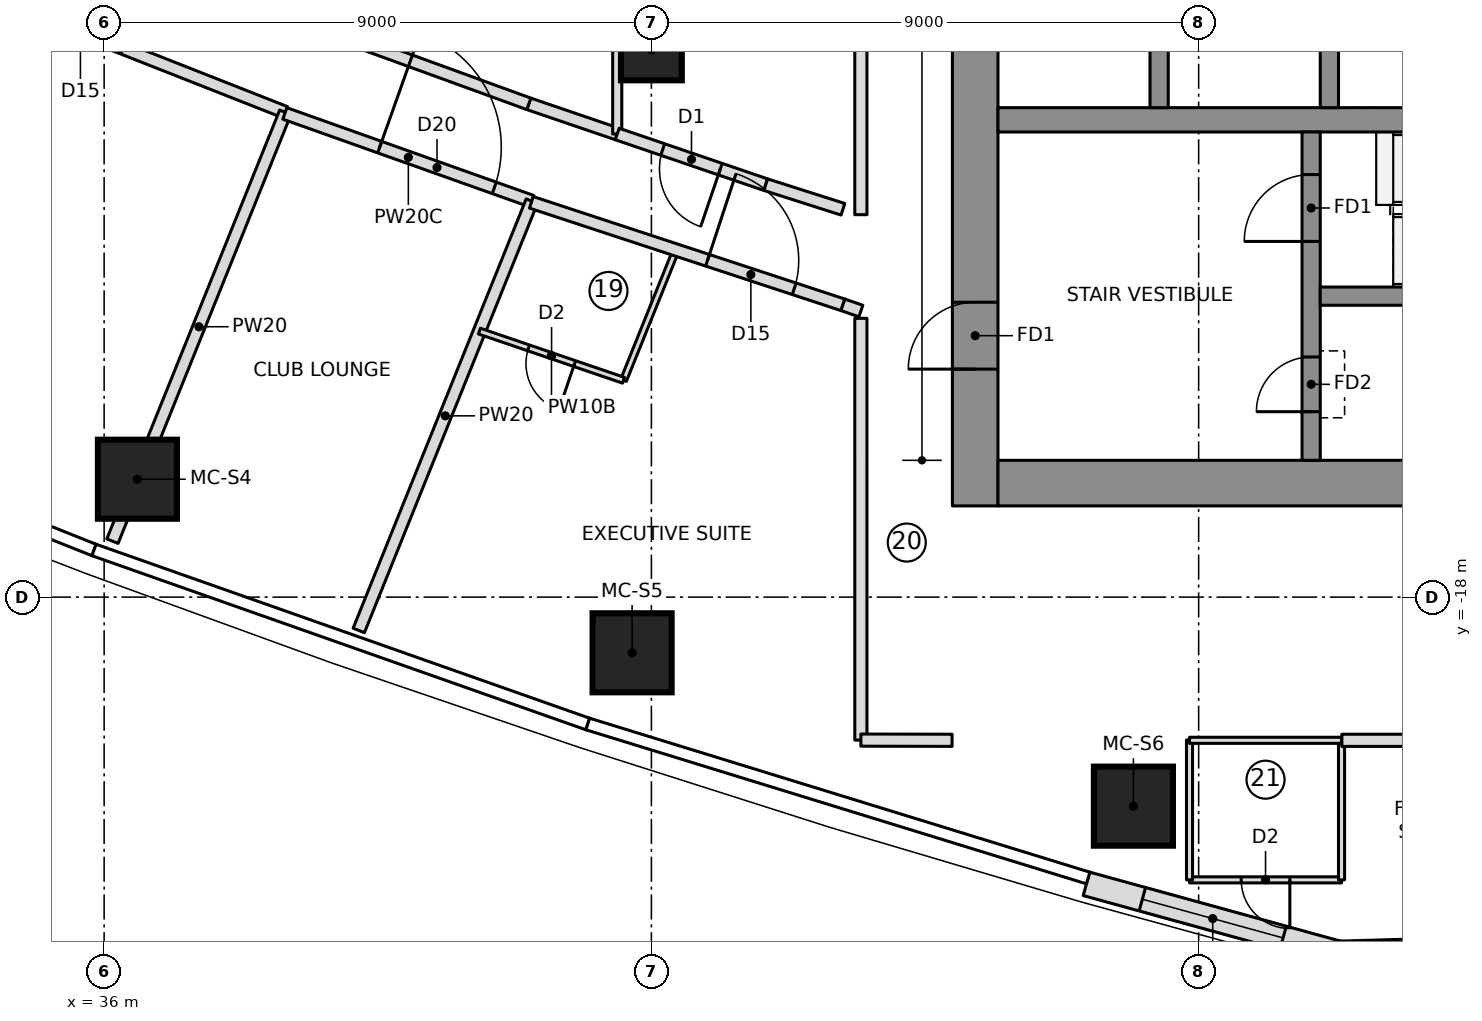
"""IFC4 building model, lengths in metres.
Left out: names, types, materials, properties, quantities, classifications, styles, units other than length and angle.
Written with IfcOpenShell. Run it as: python <this file> out.ifc"""

import sys

from ifc_helpers import new_model, si_unit, direction, frame, frame_2d, origin, origin_2d, place, context, subcontext, project, spatial, polyline, rectangle, outline, extrude, element, fill, save


model = new_model("IFC4")
c1 = context("Model", 3, precision=1e-05, world=origin(), true_north=direction((0.0, 1.0)))
c2 = subcontext(c1, "Body", "Model", "MODEL_VIEW")
j1 = project(units=[si_unit("LENGTHUNIT", "METRE"), si_unit("PLANEANGLEUNIT", "RADIAN")], contexts=[c1])
p1 = place(None, origin())
s1 = spatial("IfcSite", under=j1, at=p1, CompositionType="ELEMENT")
p2 = place(p1, origin())
s2 = spatial("IfcBuilding", under=s1, at=p2, CompositionType="ELEMENT")
p3 = place(p2, frame((0.0, 0.0, 200.35)))
s3 = spatial("IfcBuildingStorey", under=s2, at=p3, CompositionType="ELEMENT", Elevation=200.35)
p4 = place(p3, frame((50.325, -16.5, 0.0), z_axis=(0.0, 0.0, 1.0), x_axis=(0.0, 1.0, 0.0)))
e1 = element("IfcWall", 1, at=p4, inside=s3, PredefinedType="SHEAR", context=c2, shape_type="SweptSolid", body=[
    extrude(rectangle(XDim=9.85, YDim=0.75, at=frame_2d((4.925, 0.0))), origin(), (0.0, 0.0, 1.0), 3.55),
])
p5 = place(p4, frame((2.25, 0.0, 0.0)))
e2 = element("IfcOpeningElement", 2, at=p5, cuts=e1, PredefinedType="OPENING", context=c2, shape_type="SweptSolid", body=[
    extrude(rectangle(XDim=1.1, YDim=2.1, at=frame_2d((0.55, 1.05))), frame((0.0, 0.385, 0.0), z_axis=(0.0, -1.0, 0.0), x_axis=(1.0, 0.0, 0.0)), (0.0, 0.0, 1.0), 0.77),
])
p6 = place(p3, frame((50.7, -16.125, 0.0), z_axis=(0.0, 0.0, 1.0), x_axis=(1.0, 0.0, 0.0)))
e3 = element("IfcWall", 3, at=p6, inside=s3, PredefinedType="SHEAR", context=c2, shape_type="SweptSolid", body=[
    extrude(rectangle(XDim=13.77, YDim=0.75, at=frame_2d((6.885, 0.0))), origin(), (0.0, 0.0, 1.0), 3.55),
])
p7 = place(p3, frame((50.7, -10.15, 0.0), z_axis=(0.0, 0.0, 1.0), x_axis=(1.0, 0.0, 0.0)))
e4 = element("IfcWall", 4, at=p7, inside=s3, PredefinedType="SHEAR", context=c2, shape_type="SweptSolid", body=[
    extrude(rectangle(XDim=13.02, YDim=0.4, at=frame_2d((6.51, 0.0))), origin(), (0.0, 0.0, 1.0), 3.55),
])
for number, where, z_axis, x_axis in (
    (5, (53.35, -9.95, 0.0), (0.0, 0.0, 1.0), (0.0, 1.0, 0.0)),
    (6, (56.15, -9.95, 0.0), (0.0, 0.0, 1.0), (0.0, 1.0, 0.0)),
):
    element("IfcWall", number, at=place(p3, frame(where, z_axis=z_axis, x_axis=x_axis)), inside=s3, PredefinedType="SHEAR", context=c2, shape_type="SweptSolid", body=[
        extrude(rectangle(XDim=3.0, YDim=0.3, at=frame_2d((1.5, 0.0))), origin(), (0.0, 0.0, 1.0), 3.55),
    ])
p8 = place(p3, frame((55.85, -15.75, 0.0), z_axis=(0.0, 0.0, 1.0), x_axis=(0.0, 1.0, 0.0)))
e7 = element("IfcWall", 7, at=p8, inside=s3, PredefinedType="SHEAR", context=c2, shape_type="SweptSolid", body=[
    extrude(rectangle(XDim=5.4, YDim=0.3, at=frame_2d((2.7, 0.0))), origin(), (0.0, 0.0, 1.0), 3.55),
])
p9 = place(p8, frame((3.6, 0.0, 0.0)))
e8 = element("IfcOpeningElement", 8, at=p9, cuts=e7, PredefinedType="OPENING", context=c2, shape_type="SweptSolid", body=[
    extrude(rectangle(XDim=1.1, YDim=2.1, at=frame_2d((0.55, 1.05))), frame((0.0, 0.16, 0.0), z_axis=(0.0, -1.0, 0.0), x_axis=(1.0, 0.0, 0.0)), (0.0, 0.0, 1.0), 0.32),
])
p10 = place(p8, frame((0.8, 0.0, 0.0)))
e9 = element("IfcOpeningElement", 9, at=p10, cuts=e7, PredefinedType="OPENING", context=c2, shape_type="SweptSolid", body=[
    extrude(rectangle(XDim=0.9, YDim=2.1, at=frame_2d((0.45, 1.05))), frame((0.0, 0.16, 0.0), z_axis=(0.0, -1.0, 0.0), x_axis=(1.0, 0.0, 0.0)), (0.0, 0.0, 1.0), 0.32),
])
p11 = place(p3, frame((56.0, -13.05, 0.0), z_axis=(0.0, 0.0, 1.0), x_axis=(1.0, 0.0, 0.0)))
e10 = element("IfcWall", 10, at=p11, inside=s3, PredefinedType="SHEAR", context=c2, shape_type="SweptSolid", body=[
    extrude(rectangle(XDim=7.72, YDim=0.3, at=frame_2d((3.86, 0.0))), origin(), (0.0, 0.0, 1.0), 3.55),
])
for number, where, z_axis, x_axis in (
    (11, (36.547, -16.061, 0.0), (0.0, 0.0, 1.0), (1.0, 0.0, 0.0)),
    (12, (44.683, -18.916, 0.0), (0.0, 0.0, 1.0), (1.0, 0.0, 0.0)),
    (13, (52.927, -21.438, 0.0), (0.0, 0.0, 1.0), (1.0, 0.0, 0.0)),
):
    element("IfcColumn", number, at=place(p3, frame(where, z_axis=z_axis, x_axis=x_axis)), inside=s3, PredefinedType="COLUMN", context=c2, shape_type="SweptSolid", body=[
        extrude(rectangle(XDim=1.3, YDim=1.3, at=origin_2d()), origin(), (0.0, 0.0, 1.0), 3.55),
    ])
p12 = place(p3, frame((45.0, -9.0, 0.0), z_axis=(0.0, 0.0, 1.0), x_axis=(1.0, 0.0, 0.0)))
e14 = element("IfcColumn", 14, at=p12, inside=s3, PredefinedType="COLUMN", context=c2, shape_type="SweptSolid", body=[
    extrude(rectangle(XDim=1.0, YDim=1.0, at=origin_2d()), origin(), (0.0, 0.0, 1.0), 3.55),
])
p13 = place(p3, frame((52.155, -22.716, 0.0), z_axis=(0.0, 0.0, 1.0), x_axis=(0.964205755089, -0.265155165617, 0.0)))
e15 = element("IfcWall", 15, at=p13, inside=s3, PredefinedType="NOTDEFINED", context=c2, shape_type="SweptSolid", body=[
    extrude(outline(polyline([(0.0, -0.2), (4.337, -0.2), (4.277, 0.2), (0.0, 0.2), (0.0, -0.2)])), origin(), (0.0, 0.0, 1.0), 3.25),
])
p14 = place(p13, frame((0.954, 0.0, 0.5)))
e16 = element("IfcOpeningElement", 16, at=p14, cuts=e15, PredefinedType="OPENING", context=c2, shape_type="SweptSolid", body=[
    extrude(rectangle(XDim=2.4, YDim=2.0, at=frame_2d((1.2, 1.0))), frame((0.0, 0.21, 0.0), z_axis=(0.0, -1.0, 0.0), x_axis=(1.0, 0.0, 0.0)), (0.0, 0.0, 1.0), 0.42),
])
p15 = place(p3, frame((56.308, -23.858, 0.0), z_axis=(0.0, 0.0, 1.0), x_axis=(0.999587920197, 0.028705222472, 0.0)))
e17 = element("IfcWall", 17, at=p15, inside=s3, PredefinedType="NOTDEFINED", context=c2, shape_type="SweptSolid", body=[
    extrude(outline(polyline([(-0.03, -0.2), (3.989, -0.2), (3.87, 0.2), (0.03, 0.2), (-0.03, -0.2)])), origin(), (0.0, 0.0, 1.0), 3.25),
])
p16 = place(p15, frame((0.865, 0.0, 0.6)))
e18 = element("IfcOpeningElement", 18, at=p16, cuts=e17, PredefinedType="OPENING", context=c2, shape_type="SweptSolid", body=[
    extrude(outline(polyline([(0.0, 1.35), (0.084, 1.771), (0.322, 2.128), (0.679, 2.366), (1.1, 2.45), (1.521, 2.366), (1.878, 2.128), (2.116, 1.771), (2.2, 1.35), (2.2, 1.1), (2.116, 0.679), (1.878, 0.322), (1.521, 0.084), (1.1, 0.0), (0.679, 0.084), (0.322, 0.322), (0.084, 0.679), (0.0, 1.1), (0.0, 1.35)])), frame((0.0, 0.21, 0.0), z_axis=(0.0, -1.0, 0.0), x_axis=(1.0, 0.0, 0.0)), (0.0, 0.0, 1.0), 0.42),
])
p17 = place(p3, frame((56.35, -22.65, 0.0), z_axis=(0.0, 0.0, 1.0), x_axis=(-1.0, 0.0, 0.0)))
e19 = element("IfcWall", 19, at=p17, inside=s3, PredefinedType="PARTITIONING", context=c2, shape_type="SweptSolid", body=[
    extrude(rectangle(XDim=2.5, YDim=0.1, at=frame_2d((1.25, 0.0))), origin(), (0.0, 0.0, 1.0), 3.25),
])
p18 = place(p17, frame((0.85, 0.0, 0.0)))
e20 = element("IfcOpeningElement", 20, at=p18, cuts=e19, PredefinedType="OPENING", context=c2, shape_type="SweptSolid", body=[
    extrude(rectangle(XDim=0.8, YDim=2.1, at=frame_2d((0.4, 1.05))), frame((0.0, 0.06, 0.0), z_axis=(0.0, -1.0, 0.0), x_axis=(1.0, 0.0, 0.0)), (0.0, 0.0, 1.0), 0.12),
])
for number, where, z_axis, x_axis in (
    (21, (53.85, -22.65, 0.0), (0.0, 0.0, 1.0), (0.0, 1.0, 0.0)),
    (22, (56.35, -20.35, 0.0), (0.0, 0.0, 1.0), (0.0, -1.0, 0.0)),
):
    element("IfcWall", number, at=place(p3, frame(where, z_axis=z_axis, x_axis=x_axis)), inside=s3, PredefinedType="PARTITIONING", context=c2, shape_type="SweptSolid", body=[
        extrude(rectangle(XDim=2.3, YDim=0.1, at=frame_2d((1.15, 0.0))), origin(), (0.0, 0.0, 1.0), 3.25),
    ])
p19 = place(p3, frame((30.958, -6.866, 0.0), z_axis=(0.0, 0.0, 1.0), x_axis=(0.93040517394, -0.366532689274, 0.0)))
e23 = element("IfcWall", 23, at=p19, inside=s3, PredefinedType="PARTITIONING", context=c2, shape_type="SweptSolid", body=[
    extrude(rectangle(XDim=8.622, YDim=0.2, at=frame_2d((4.311, 0.0))), origin(), (0.0, 0.0, 1.0), 3.25),
])
p20 = place(p19, frame((4.25, 0.0, 0.0)))
e24 = element("IfcOpeningElement", 24, at=p20, cuts=e23, PredefinedType="OPENING", context=c2, shape_type="SweptSolid", body=[
    extrude(rectangle(XDim=1.5, YDim=2.1, at=frame_2d((0.75, 1.05))), frame((0.0, 0.11, 0.0), z_axis=(0.0, -1.0, 0.0), x_axis=(1.0, 0.0, 0.0)), (0.0, 0.0, 1.0), 0.22),
])
p21 = place(p3, frame((36.137, -17.079, 0.0), z_axis=(0.0, 0.0, 1.0), x_axis=(0.373863662938, 0.927483671843, 0.0)))
e25 = element("IfcWall", 25, at=p21, inside=s3, PredefinedType="PARTITIONING", context=c2, shape_type="SweptSolid", body=[
    extrude(rectangle(XDim=7.604, YDim=0.2, at=frame_2d((3.802, 0.0))), origin(), (0.0, 0.0, 1.0), 3.25),
])
p22 = place(p3, frame((38.972, -10.045, 0.0), z_axis=(0.0, 0.0, 1.0), x_axis=(0.942220252757, -0.334994022773, 0.0)))
e26 = element("IfcWall", 26, at=p22, inside=s3, PredefinedType="PARTITIONING", context=c2, shape_type="SweptSolid", body=[
    extrude(rectangle(XDim=4.31, YDim=0.2, at=frame_2d((2.155, 0.0))), origin(), (0.0, 0.0, 1.0), 3.25),
])
p23 = place(p22, frame((1.655, 0.0, 0.0)))
e27 = element("IfcOpeningElement", 27, at=p23, cuts=e26, PredefinedType="OPENING", context=c2, shape_type="SweptSolid", body=[
    extrude(rectangle(XDim=2.0, YDim=2.4, at=frame_2d((1.0, 1.2))), frame((0.0, 0.11, 0.0), z_axis=(0.0, -1.0, 0.0), x_axis=(1.0, 0.0, 0.0)), (0.0, 0.0, 1.0), 0.22),
])
p24 = place(p3, frame((40.188, -18.548, 0.0), z_axis=(0.0, 0.0, 1.0), x_axis=(0.373877998371, 0.927477893178, 0.0)))
e28 = element("IfcWall", 28, at=p24, inside=s3, PredefinedType="PARTITIONING", context=c2, shape_type="SweptSolid", body=[
    extrude(rectangle(XDim=7.611, YDim=0.2, at=frame_2d((3.806, 0.0))), origin(), (0.0, 0.0, 1.0), 3.25),
])
p25 = place(p3, frame((45.395, -12.318, 0.0), z_axis=(0.0, 0.0, 1.0), x_axis=(-0.373917841166, -0.927461831052, 0.0)))
e29 = element("IfcWall", 29, at=p25, inside=s3, PredefinedType="PARTITIONING", context=c2, shape_type="SweptSolid", body=[
    extrude(rectangle(XDim=2.281, YDim=0.1, at=frame_2d((1.14, 0.0))), origin(), (0.0, 0.0, 1.0), 3.25),
])
p26 = place(p3, frame((44.542, -14.434, 0.0), z_axis=(0.0, 0.0, 1.0), x_axis=(-0.946406575113, 0.322977699822, 0.0)))
e30 = element("IfcWall", 30, at=p26, inside=s3, PredefinedType="PARTITIONING", context=c2, shape_type="SweptSolid", body=[
    extrude(rectangle(XDim=2.504, YDim=0.1, at=frame_2d((1.252, 0.0))), origin(), (0.0, 0.0, 1.0), 3.25),
])
p27 = place(p26, frame((0.85, 0.0, 0.0)))
e31 = element("IfcOpeningElement", 31, at=p27, cuts=e30, PredefinedType="OPENING", context=c2, shape_type="SweptSolid", body=[
    extrude(rectangle(XDim=0.8, YDim=2.1, at=frame_2d((0.4, 1.05))), frame((0.0, 0.06, 0.0), z_axis=(0.0, -1.0, 0.0), x_axis=(1.0, 0.0, 0.0)), (0.0, 0.0, 1.0), 0.12),
])
p28 = place(p3, frame((44.438, -10.383, 0.0), z_axis=(0.0, 0.0, 1.0), x_axis=(-0.946450589454, 0.32284869788, 0.0)))
e32 = element("IfcWall", 32, at=p28, inside=s3, PredefinedType="PARTITIONING", context=c2, shape_type="SweptSolid", body=[
    extrude(rectangle(XDim=1.536, YDim=0.2, at=frame_2d((0.768, 0.0))), origin(), (0.0, 0.0, 1.0), 3.25),
])
p29 = place(p3, frame((42.984, -9.887, 0.0), z_axis=(0.0, 0.0, 1.0), x_axis=(-0.939727613335, 0.341923986779, 0.0)))
e33 = element("IfcWall", 33, at=p29, inside=s3, PredefinedType="PARTITIONING", context=c2, shape_type="SweptSolid", body=[
    extrude(rectangle(XDim=4.117, YDim=0.2, at=frame_2d((2.059, 0.0))), origin(), (0.0, 0.0, 1.0), 3.25),
])
p30 = place(p3, frame((44.438, -10.383, 0.0), z_axis=(0.0, 0.0, 1.0), x_axis=(0.0, 1.0, 0.0)))
e34 = element("IfcWall", 34, at=p30, inside=s3, PredefinedType="PARTITIONING", context=c2, shape_type="SweptSolid", body=[
    extrude(rectangle(XDim=20.766, YDim=0.15, at=frame_2d((10.383, 0.0))), origin(), (0.0, 0.0, 1.0), 3.25),
])
p31 = place(p3, frame((46.881, -11.217, 0.0), z_axis=(0.0, 0.0, 1.0), x_axis=(-0.946427432629, 0.322916575554, 0.0)))
e35 = element("IfcWall", 35, at=p31, inside=s3, PredefinedType="PARTITIONING", context=c2, shape_type="SweptSolid", body=[
    extrude(rectangle(XDim=2.581, YDim=0.2, at=frame_2d((1.291, 0.0))), origin(), (0.0, 0.0, 1.0), 3.25),
])
p32 = place(p31, frame((0.791, 0.0, 0.0)))
e36 = element("IfcOpeningElement", 36, at=p32, cuts=e35, PredefinedType="OPENING", context=c2, shape_type="SweptSolid", body=[
    extrude(rectangle(XDim=1.0, YDim=2.1, at=frame_2d((0.5, 1.05))), frame((0.0, 0.11, 0.0), z_axis=(0.0, -1.0, 0.0), x_axis=(1.0, 0.0, 0.0)), (0.0, 0.0, 1.0), 0.22),
])
p33 = place(p3, frame((56.355, -20.355, 0.0), z_axis=(0.0, 0.0, 1.0), x_axis=(1.0, 0.0, 0.0)))
e37 = element("IfcWall", 37, at=p33, inside=s3, PredefinedType="PARTITIONING", context=c2, shape_type="SweptSolid", body=[
    extrude(rectangle(XDim=7.354, YDim=0.2, at=frame_2d((3.677, 0.0))), origin(), (0.0, 0.0, 1.0), 3.25),
])
p34 = place(p33, frame((2.624, 0.0, 0.0)))
e38 = element("IfcOpeningElement", 38, at=p34, cuts=e37, PredefinedType="OPENING", context=c2, shape_type="SweptSolid", body=[
    extrude(rectangle(XDim=1.5, YDim=2.1, at=frame_2d((0.75, 1.05))), frame((0.0, 0.11, 0.0), z_axis=(0.0, -1.0, 0.0), x_axis=(1.0, 0.0, 0.0)), (0.0, 0.0, 1.0), 0.22),
])
p35 = place(p3, frame((53.85, -20.355, 0.0), z_axis=(0.0, 0.0, 1.0), x_axis=(1.0, 0.0, 0.0)))
e39 = element("IfcWall", 39, at=p35, inside=s3, PredefinedType="PARTITIONING", context=c2, shape_type="SweptSolid", body=[
    extrude(rectangle(XDim=2.5, YDim=0.1, at=frame_2d((1.25, 0.0))), origin(), (0.0, 0.0, 1.0), 3.25),
])
p36 = place(p3, frame((43.026, -11.507, 0.0), z_axis=(0.0, 0.0, 1.0), x_axis=(0.949951949432, -0.312396052744, 0.0)))
e40 = element("IfcWall", 40, at=p36, inside=s3, PredefinedType="PARTITIONING", context=c2, shape_type="SweptSolid", body=[
    extrude(rectangle(XDim=5.394, YDim=0.2, at=frame_2d((2.697, 0.0))), origin(), (0.0, 0.0, 1.0), 3.25),
])
p37 = place(p36, frame((3.05, 0.0, 0.0)))
e41 = element("IfcOpeningElement", 41, at=p37, cuts=e40, PredefinedType="OPENING", context=c2, shape_type="SweptSolid", body=[
    extrude(rectangle(XDim=1.5, YDim=2.1, at=frame_2d((0.75, 1.05))), frame((0.0, 0.11, 0.0), z_axis=(0.0, -1.0, 0.0), x_axis=(1.0, 0.0, 0.0)), (0.0, 0.0, 1.0), 0.22),
])
p38 = place(p3, frame((48.15, -11.621, 0.0), z_axis=(0.0, 0.0, 1.0), x_axis=(-0.952761948983, 0.303718074157, 0.0)))
e42 = element("IfcWall", 42, at=p38, inside=s3, PredefinedType="PARTITIONING", context=c2, shape_type="SweptSolid", body=[
    extrude(rectangle(XDim=1.332, YDim=0.2, at=frame_2d((0.666, 0.0))), origin(), (0.0, 0.0, 1.0), 3.25),
])
p39 = place(p3, frame((48.445, 11.71, 0.0), z_axis=(0.0, 0.0, 1.0), x_axis=(0.0, -1.0, 0.0)))
e43 = element("IfcWall", 43, at=p39, inside=s3, PredefinedType="PARTITIONING", context=c2, shape_type="SweptSolid", body=[
    extrude(rectangle(XDim=23.42, YDim=0.2, at=frame_2d((11.71, 0.0))), origin(), (0.0, 0.0, 1.0), 3.25),
])
p40 = place(p3, frame((48.15, -13.192, 0.0), z_axis=(0.0, 0.0, 1.0), x_axis=(0.944623214561, -0.328156947987, 0.0)))
e44 = element("IfcWall", 44, at=p40, inside=s3, PredefinedType="PARTITIONING", context=c2, shape_type="SweptSolid", body=[
    extrude(rectangle(XDim=0.312, YDim=0.2, at=frame_2d((0.156, 0.0))), origin(), (0.0, 0.0, 1.0), 3.25),
])
p41 = place(p3, frame((48.445, -13.415, 0.0), z_axis=(0.0, 0.0, 1.0), x_axis=(3.5195157e-05, -0.999999999381, 0.0)))
e45 = element("IfcWall", 45, at=p41, inside=s3, PredefinedType="PARTITIONING", context=c2, shape_type="SweptSolid", body=[
    extrude(rectangle(XDim=6.937, YDim=0.2, at=frame_2d((3.468, 0.0))), origin(), (0.0, 0.0, 1.0), 3.25),
])
p42 = place(p3, frame((48.445, -20.352, 0.0), z_axis=(0.0, 0.0, 1.0), x_axis=(0.999997403051, -0.002279010849, 0.0)))
e46 = element("IfcWall", 46, at=p42, inside=s3, PredefinedType="PARTITIONING", context=c2, shape_type="SweptSolid", body=[
    extrude(rectangle(XDim=1.5, YDim=0.2, at=frame_2d((0.75, 0.0))), origin(), (0.0, 0.0, 1.0), 3.25),
])
p43 = place(p14, origin())
e47 = element("IfcWindow", 47, at=p43, inside=s3, PartitioningType="SINGLE_PANEL", PredefinedType="WINDOW", context=c2, shape_type="SweptSolid", body=[
    extrude(rectangle(XDim=2.4, YDim=2.0, at=frame_2d((1.2, 1.0))), frame((0.0, 0.17, 0.0), z_axis=(0.0, -1.0, 0.0), x_axis=(1.0, 0.0, 0.0)), (0.0, 0.0, 1.0), 0.06),
])
fill(e16, e47)
p44 = place(p16, origin())
e48 = element("IfcWindow", 48, at=p44, inside=s3, PartitioningType="SINGLE_PANEL", PredefinedType="WINDOW", context=c2, shape_type="SweptSolid", body=[
    extrude(outline(polyline([(0.0, 1.35), (0.084, 1.771), (0.322, 2.128), (0.679, 2.366), (1.1, 2.45), (1.521, 2.366), (1.878, 2.128), (2.116, 1.771), (2.2, 1.35), (2.2, 1.1), (2.116, 0.679), (1.878, 0.322), (1.521, 0.084), (1.1, 0.0), (0.679, 0.084), (0.322, 0.322), (0.084, 0.679), (0.0, 1.1), (0.0, 1.35)])), frame((0.0, 0.17, 0.0), z_axis=(0.0, -1.0, 0.0), x_axis=(1.0, 0.0, 0.0)), (0.0, 0.0, 1.0), 0.06),
])
fill(e18, e48)
p45 = place(p18, origin())
e49 = element("IfcDoor", 49, at=p45, inside=s3, OperationType="SINGLE_SWING_LEFT", PredefinedType="DOOR", context=c2, shape_type="SweptSolid", body=[
    extrude(rectangle(XDim=0.8, YDim=2.1, at=frame_2d((0.4, 1.05))), frame((0.0, 0.025, 0.0), z_axis=(0.0, -1.0, 0.0), x_axis=(1.0, 0.0, 0.0)), (0.0, 0.0, 1.0), 0.05),
])
fill(e20, e49)
p46 = place(p23, origin())
e50 = element("IfcDoor", 50, at=p46, inside=s3, OperationType="DOUBLE_DOOR_SINGLE_SWING", PredefinedType="DOOR", context=c2, shape_type="SweptSolid", body=[
    extrude(rectangle(XDim=2.0, YDim=2.4, at=frame_2d((1.0, 1.2))), frame((0.0, 0.025, 0.0), z_axis=(0.0, -1.0, 0.0), x_axis=(1.0, 0.0, 0.0)), (0.0, 0.0, 1.0), 0.05),
])
fill(e27, e50)
p47 = place(p27, origin())
e51 = element("IfcDoor", 51, at=p47, inside=s3, OperationType="SINGLE_SWING_LEFT", PredefinedType="DOOR", context=c2, shape_type="SweptSolid", body=[
    extrude(rectangle(XDim=0.8, YDim=2.1, at=frame_2d((0.4, 1.05))), frame((0.0, 0.025, 0.0), z_axis=(0.0, -1.0, 0.0), x_axis=(1.0, 0.0, 0.0)), (0.0, 0.0, 1.0), 0.05),
])
fill(e31, e51)
p48 = place(p37, origin())
e52 = element("IfcDoor", 52, at=p48, inside=s3, OperationType="DOUBLE_DOOR_SINGLE_SWING", PredefinedType="DOOR", context=c2, shape_type="SweptSolid", body=[
    extrude(rectangle(XDim=1.5, YDim=2.1, at=frame_2d((0.75, 1.05))), frame((0.0, 0.025, 0.0), z_axis=(0.0, -1.0, 0.0), x_axis=(1.0, 0.0, 0.0)), (0.0, 0.0, 1.0), 0.05),
])
fill(e41, e52)
p49 = place(p32, origin())
e53 = element("IfcDoor", 53, at=p49, inside=s3, OperationType="SINGLE_SWING_LEFT", PredefinedType="DOOR", context=c2, shape_type="SweptSolid", body=[
    extrude(rectangle(XDim=1.0, YDim=2.1, at=frame_2d((0.5, 1.05))), frame((0.0, 0.025, 0.0), z_axis=(0.0, -1.0, 0.0), x_axis=(1.0, 0.0, 0.0)), (0.0, 0.0, 1.0), 0.05),
])
fill(e36, e53)
p50 = place(p9, origin())
e54 = element("IfcDoor", 54, at=p50, inside=s3, OperationType="SINGLE_SWING_RIGHT", PredefinedType="DOOR", context=c2, shape_type="SweptSolid", body=[
    extrude(rectangle(XDim=1.1, YDim=2.1, at=frame_2d((0.55, 1.05))), frame((0.0, 0.025, 0.0), z_axis=(0.0, -1.0, 0.0), x_axis=(1.0, 0.0, 0.0)), (0.0, 0.0, 1.0), 0.05),
])
fill(e8, e54)
p51 = place(p5, origin())
e55 = element("IfcDoor", 55, at=p51, inside=s3, OperationType="SINGLE_SWING_RIGHT", PredefinedType="DOOR", context=c2, shape_type="SweptSolid", body=[
    extrude(rectangle(XDim=1.1, YDim=2.1, at=frame_2d((0.55, 1.05))), frame((0.0, 0.025, 0.0), z_axis=(0.0, -1.0, 0.0), x_axis=(1.0, 0.0, 0.0)), (0.0, 0.0, 1.0), 0.05),
])
fill(e2, e55)
p52 = place(p10, origin())
e56 = element("IfcDoor", 56, at=p52, inside=s3, OperationType="SINGLE_SWING_LEFT", PredefinedType="DOOR", context=c2, shape_type="SweptSolid", body=[
    extrude(rectangle(XDim=0.9, YDim=2.1, at=frame_2d((0.45, 1.05))), frame((0.0, 0.025, 0.0), z_axis=(0.0, -1.0, 0.0), x_axis=(1.0, 0.0, 0.0)), (0.0, 0.0, 1.0), 0.05),
])
fill(e9, e56)
save(model, sys.argv[1])
